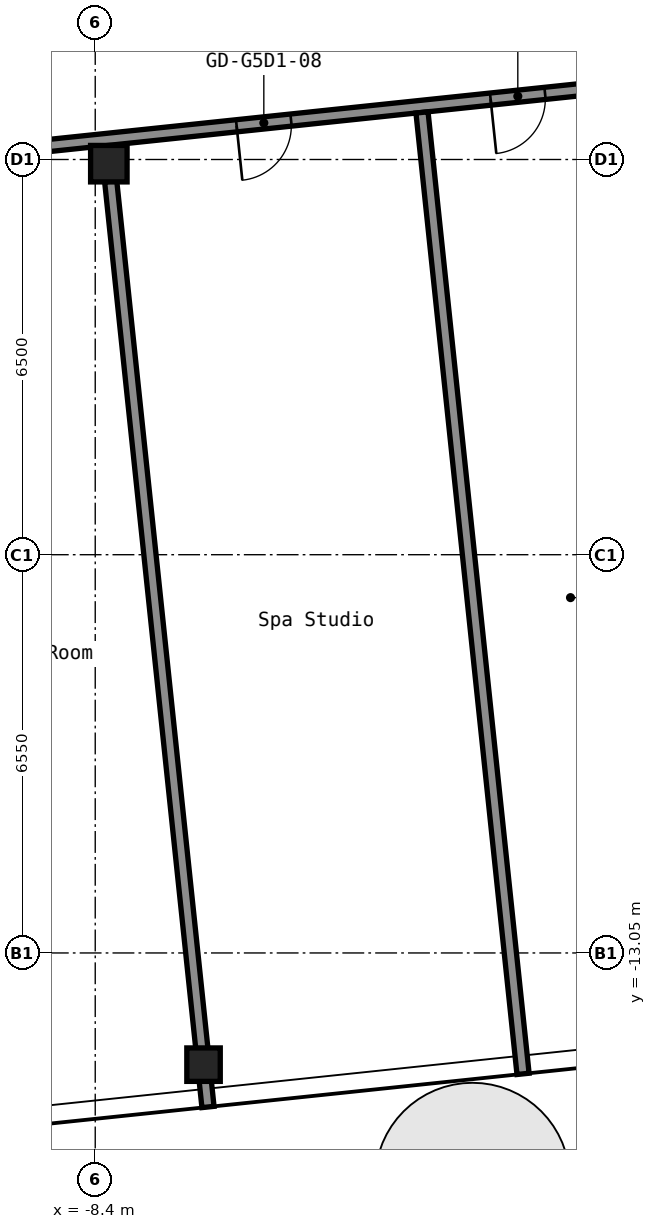
"""IFC4 building model, lengths in metres.
Left out: names, types, materials, properties, quantities, classifications, styles, units other than length and angle.
Written with IfcOpenShell. Run it as: python <this file> out.ifc"""

import sys

from ifc_helpers import new_model, si_unit, direction, frame, frame_2d, origin, origin_2d, place, context, subcontext, project, spatial, rectangle, hollow_rectangle, extrude, element, fill, save


model = new_model("IFC4")
c1 = context("Model", 3, precision=1e-05, world=origin(), true_north=direction((0.0, 1.0)))
c2 = subcontext(c1, "Body", "Model", "MODEL_VIEW")
j1 = project(units=[si_unit("LENGTHUNIT", "METRE"), si_unit("PLANEANGLEUNIT", "RADIAN")], contexts=[c1])
p1 = place(None, origin())
s1 = spatial("IfcSite", under=j1, at=p1, CompositionType="ELEMENT")
p2 = place(p1, origin())
s2 = spatial("IfcBuilding", under=s1, at=p2, CompositionType="ELEMENT")
p3 = place(p2, frame((0.0, 0.0, 261.4)))
s3 = spatial("IfcBuildingStorey", under=s2, at=p3, CompositionType="ELEMENT", Elevation=261.4)
p4 = place(p3, frame((-6.619, -14.887, 0.0), z_axis=(0.0, 0.0, 1.0), x_axis=(1.0, 0.0, 0.0)))
e1 = element("IfcColumn", 1, at=p4, inside=s3, PredefinedType="COLUMN", context=c2, shape_type="SweptSolid", body=[
    extrude(hollow_rectangle(XDim=0.55, YDim=0.55, WallThickness=0.022, InnerFilletRadius=0.033, OuterFilletRadius=0.055, at=origin_2d()), origin(), (0.0, 0.0, 1.0), 2.75),
])
p5 = place(p3, frame((-8.176, -0.069, 0.0), z_axis=(0.0, 0.0, 1.0), x_axis=(1.0, 0.0, 0.0)))
e2 = element("IfcColumn", 2, at=p5, inside=s3, PredefinedType="COLUMN", context=c2, shape_type="SweptSolid", body=[
    extrude(hollow_rectangle(XDim=0.6, YDim=0.6, WallThickness=0.025, InnerFilletRadius=0.038, OuterFilletRadius=0.062, at=origin_2d()), origin(), (0.0, 0.0, 1.0), 2.75),
])
p6 = place(p3, frame((-16.572, -0.549, 0.0), z_axis=(0.0, 0.0, 1.0), x_axis=(0.994521146831, 0.104535584879, 0.0)))
e3 = element("IfcWall", 3, at=p6, inside=s3, PredefinedType="PARTITIONING", context=c2, shape_type="SweptSolid", body=[
    extrude(rectangle(XDim=33.561, YDim=0.2, at=frame_2d((16.78, 0.0))), origin(), (0.0, 0.0, 1.0), 2.75),
])
p7 = place(p6, frame((1.315, 0.0, 0.0)))
e4 = element("IfcOpeningElement", 4, at=p7, cuts=e3, PredefinedType="OPENING", context=c2, shape_type="SweptSolid", body=[
    extrude(rectangle(XDim=0.9, YDim=2.1, at=frame_2d((0.45, 1.05))), frame((0.0, 0.11, 0.0), z_axis=(0.0, -1.0, 0.0), x_axis=(1.0, 0.0, 0.0)), (0.0, 0.0, 1.0), 0.22),
])
p8 = place(p6, frame((5.515, 0.0, 0.0)))
e5 = element("IfcOpeningElement", 5, at=p8, cuts=e3, PredefinedType="OPENING", context=c2, shape_type="SweptSolid", body=[
    extrude(rectangle(XDim=0.9, YDim=2.1, at=frame_2d((0.45, 1.05))), frame((0.0, 0.11, 0.0), z_axis=(0.0, -1.0, 0.0), x_axis=(1.0, 0.0, 0.0)), (0.0, 0.0, 1.0), 0.22),
])
p9 = place(p6, frame((10.555, 0.0, 0.0)))
e6 = element("IfcOpeningElement", 6, at=p9, cuts=e3, PredefinedType="OPENING", context=c2, shape_type="SweptSolid", body=[
    extrude(rectangle(XDim=0.9, YDim=2.1, at=frame_2d((0.45, 1.05))), frame((0.0, 0.11, 0.0), z_axis=(0.0, -1.0, 0.0), x_axis=(1.0, 0.0, 0.0)), (0.0, 0.0, 1.0), 0.22),
])
p10 = place(p6, frame((14.755, 0.0, 0.0)))
e7 = element("IfcOpeningElement", 7, at=p10, cuts=e3, PredefinedType="OPENING", context=c2, shape_type="SweptSolid", body=[
    extrude(rectangle(XDim=0.9, YDim=2.1, at=frame_2d((0.45, 1.05))), frame((0.0, 0.11, 0.0), z_axis=(0.0, -1.0, 0.0), x_axis=(1.0, 0.0, 0.0)), (0.0, 0.0, 1.0), 0.22),
])
p11 = place(p6, frame((19.65, 0.0, 0.0)))
e8 = element("IfcOpeningElement", 8, at=p11, cuts=e3, PredefinedType="OPENING", context=c2, shape_type="SweptSolid", body=[
    extrude(rectangle(XDim=1.0, YDim=2.1, at=frame_2d((0.5, 1.05))), frame((0.0, 0.11, 0.0), z_axis=(0.0, -1.0, 0.0), x_axis=(1.0, 0.0, 0.0)), (0.0, 0.0, 1.0), 0.22),
])
p12 = place(p6, frame((21.35, 0.0, 0.0)))
e9 = element("IfcOpeningElement", 9, at=p12, cuts=e3, PredefinedType="OPENING", context=c2, shape_type="SweptSolid", body=[
    extrude(rectangle(XDim=1.0, YDim=2.1, at=frame_2d((0.5, 1.05))), frame((0.0, 0.11, 0.0), z_axis=(0.0, -1.0, 0.0), x_axis=(1.0, 0.0, 0.0)), (0.0, 0.0, 1.0), 0.22),
])
p13 = place(p6, frame((27.185, 0.0, 0.0)))
e10 = element("IfcOpeningElement", 10, at=p13, cuts=e3, PredefinedType="OPENING", context=c2, shape_type="SweptSolid", body=[
    extrude(rectangle(XDim=0.9, YDim=2.1, at=frame_2d((0.45, 1.05))), frame((0.0, 0.11, 0.0), z_axis=(0.0, -1.0, 0.0), x_axis=(1.0, 0.0, 0.0)), (0.0, 0.0, 1.0), 0.22),
])
p14 = place(p6, frame((31.385, 0.0, 0.0)))
e11 = element("IfcOpeningElement", 11, at=p14, cuts=e3, PredefinedType="OPENING", context=c2, shape_type="SweptSolid", body=[
    extrude(rectangle(XDim=0.9, YDim=2.1, at=frame_2d((0.45, 1.05))), frame((0.0, 0.11, 0.0), z_axis=(0.0, -1.0, 0.0), x_axis=(1.0, 0.0, 0.0)), (0.0, 0.0, 1.0), 0.22),
])
p15 = place(p3, frame((-6.546, -15.583, 0.0), z_axis=(0.0, 0.0, 1.0), x_axis=(-0.104523729364, 0.99452239291, 0.0)))
e12 = element("IfcWall", 12, at=p15, inside=s3, PredefinedType="PARTITIONING", context=c2, shape_type="SweptSolid", body=[
    extrude(rectangle(XDim=15.308, YDim=0.2, at=frame_2d((7.654, 0.0))), origin(), (0.0, 0.0, 1.0), 2.75),
])
p16 = place(p3, frame((-1.364, -15.039, 0.0), z_axis=(0.0, 0.0, 1.0), x_axis=(-0.104520927191, 0.994522687413, 0.0)))
e13 = element("IfcWall", 13, at=p16, inside=s3, PredefinedType="PARTITIONING", context=c2, shape_type="SweptSolid", body=[
    extrude(rectangle(XDim=15.9, YDim=0.2, at=frame_2d((7.95, 0.0))), origin(), (0.0, 0.0, 1.0), 2.75),
])
p17 = place(p9, origin())
e14 = element("IfcDoor", 14, at=p17, inside=s3, OperationType="SINGLE_SWING_LEFT", PredefinedType="DOOR", context=c2, shape_type="SweptSolid", body=[
    extrude(rectangle(XDim=0.9, YDim=2.1, at=frame_2d((0.45, 1.05))), frame((0.0, 0.025, 0.0), z_axis=(0.0, -1.0, 0.0), x_axis=(1.0, 0.0, 0.0)), (0.0, 0.0, 1.0), 0.05),
])
fill(e6, e14)
p18 = place(p10, origin())
e15 = element("IfcDoor", 15, at=p18, inside=s3, OperationType="SINGLE_SWING_LEFT", PredefinedType="DOOR", context=c2, shape_type="SweptSolid", body=[
    extrude(rectangle(XDim=0.9, YDim=2.1, at=frame_2d((0.45, 1.05))), frame((0.0, 0.025, 0.0), z_axis=(0.0, -1.0, 0.0), x_axis=(1.0, 0.0, 0.0)), (0.0, 0.0, 1.0), 0.05),
])
fill(e7, e15)
save(model, sys.argv[1])
